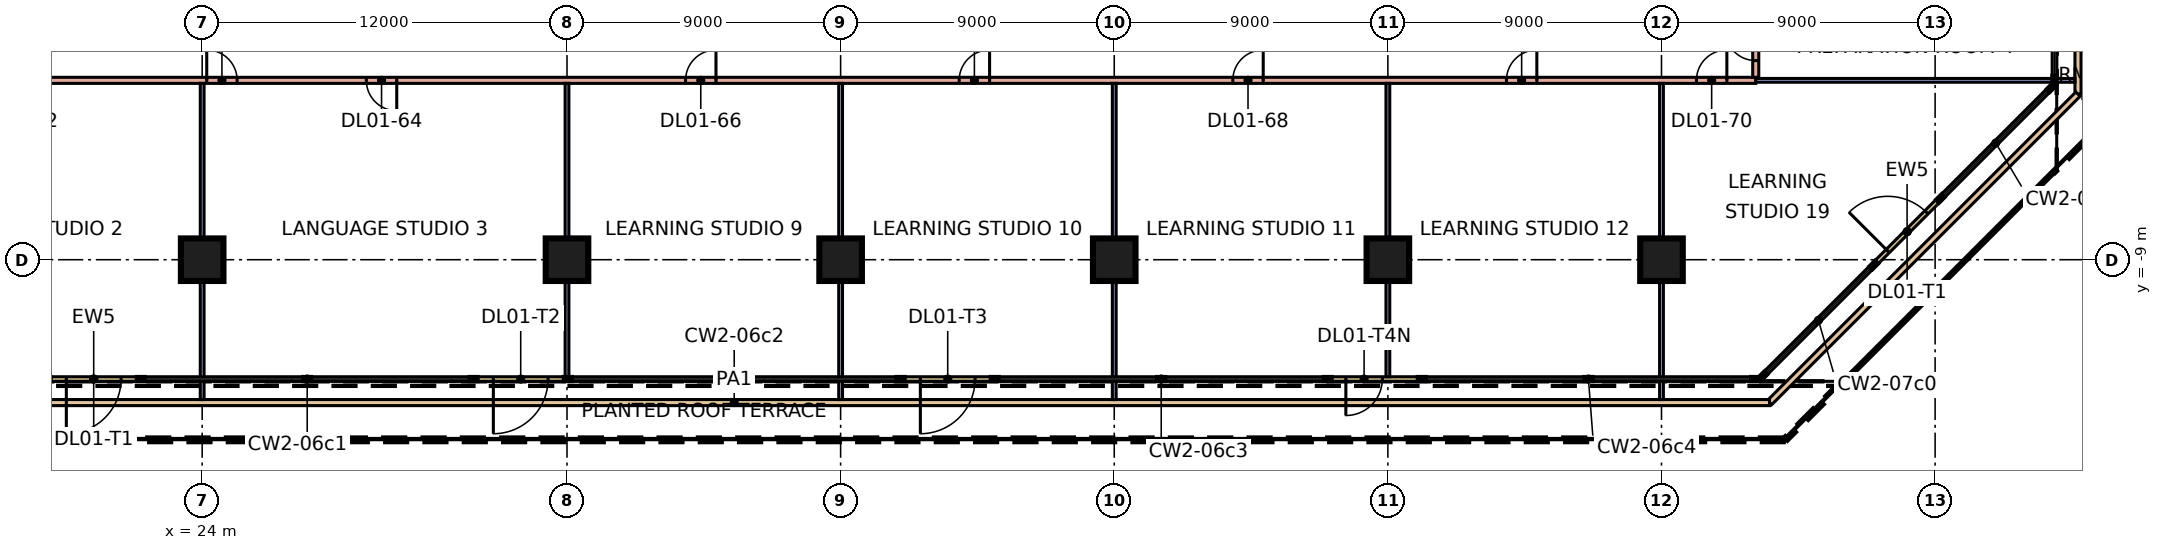
"""IFC4 building model, lengths in metres.
Left out: names, types, materials, properties, quantities, classifications, styles, units other than length and angle.
Written with IfcOpenShell. Run it as: python <this file> out.ifc"""

import sys

from ifc_helpers import new_model, si_unit, direction, frame, frame_2d, origin, origin_2d, place, context, subcontext, project, spatial, rectangle, extrude, element, fill, save


model = new_model("IFC4")
c1 = context("Model", 3, precision=1e-05, world=origin(), true_north=direction((0.0, 1.0)))
c2 = subcontext(c1, "Body", "Model", "MODEL_VIEW")
j1 = project(units=[si_unit("LENGTHUNIT", "METRE"), si_unit("PLANEANGLEUNIT", "RADIAN")], contexts=[c1])
p1 = place(None, origin())
s1 = spatial("IfcSite", under=j1, at=p1, CompositionType="ELEMENT")
p2 = place(p1, origin())
s2 = spatial("IfcBuilding", under=s1, at=p2, CompositionType="ELEMENT")
p3 = place(p2, frame((0.0, 0.0, 7.2)))
s3 = spatial("IfcBuildingStorey", under=s2, at=p3, CompositionType="ELEMENT", Elevation=7.2)
for number, where, z_axis, x_axis in (
    (1, (24.0, -9.0, 0.0), (0.0, 0.0, 1.0), (1.0, 0.0, 0.0)),
    (2, (36.0, -9.0, 0.0), (0.0, 0.0, 1.0), (1.0, 0.0, 0.0)),
    (3, (45.0, -9.0, 0.0), (0.0, 0.0, 1.0), (1.0, 0.0, 0.0)),
    (4, (54.0, -9.0, 0.0), (0.0, 0.0, 1.0), (1.0, 0.0, 0.0)),
    (5, (63.0, -9.0, 0.0), (0.0, 0.0, 1.0), (1.0, 0.0, 0.0)),
    (6, (72.0, -9.0, 0.0), (0.0, 0.0, 1.0), (1.0, 0.0, 0.0)),
):
    element("IfcColumn", number, at=place(p3, frame(where, z_axis=z_axis, x_axis=x_axis)), inside=s3, PredefinedType="COLUMN", context=c2, shape_type="SweptSolid", body=[
        extrude(rectangle(XDim=1.4, YDim=1.4, at=origin_2d()), origin(), (0.0, 0.0, 1.0), 4.8),
    ])
p4 = place(p3, frame((18.932, -12.925, 0.0), z_axis=(0.0, 0.0, 1.0), x_axis=(1.0, 0.0, 0.0)))
e7 = element("IfcWall", 7, at=p4, inside=s3, PredefinedType="SOLIDWALL", context=c2, shape_type="SweptSolid", body=[
    extrude(rectangle(XDim=3.0, YDim=0.15, at=frame_2d((1.5, 0.0))), origin(), (0.0, 0.0, 1.0), 4.4),
])
p5 = place(p4, frame((0.6, 0.0, 0.0)))
e8 = element("IfcOpeningElement", 8, at=p5, cuts=e7, PredefinedType="OPENING", context=c2, shape_type="SweptSolid", body=[
    extrude(rectangle(XDim=1.8, YDim=2.4, at=frame_2d((0.9, 1.2))), frame((0.0, 0.085, 0.0), z_axis=(0.0, -1.0, 0.0), x_axis=(1.0, 0.0, 0.0)), (0.0, 0.0, 1.0), 0.17),
])
p6 = place(p3, frame((32.977, -12.925, 0.0), z_axis=(0.0, 0.0, 1.0), x_axis=(1.0, 0.0, 0.0)))
e9 = element("IfcWall", 9, at=p6, inside=s3, PredefinedType="SOLIDWALL", context=c2, shape_type="SweptSolid", body=[
    extrude(rectangle(XDim=3.0, YDim=0.15, at=frame_2d((1.5, 0.0))), origin(), (0.0, 0.0, 1.0), 4.4),
])
p7 = place(p6, frame((0.6, 0.0, 0.0)))
e10 = element("IfcOpeningElement", 10, at=p7, cuts=e9, PredefinedType="OPENING", context=c2, shape_type="SweptSolid", body=[
    extrude(rectangle(XDim=1.8, YDim=2.4, at=frame_2d((0.9, 1.2))), frame((0.0, 0.085, 0.0), z_axis=(0.0, -1.0, 0.0), x_axis=(1.0, 0.0, 0.0)), (0.0, 0.0, 1.0), 0.17),
])
p8 = place(p3, frame((47.023, -12.925, 0.0), z_axis=(0.0, 0.0, 1.0), x_axis=(1.0, 0.0, 0.0)))
e11 = element("IfcWall", 11, at=p8, inside=s3, PredefinedType="SOLIDWALL", context=c2, shape_type="SweptSolid", body=[
    extrude(rectangle(XDim=3.0, YDim=0.15, at=frame_2d((1.5, 0.0))), origin(), (0.0, 0.0, 1.0), 4.4),
])
p9 = place(p8, frame((0.6, 0.0, 0.0)))
e12 = element("IfcOpeningElement", 12, at=p9, cuts=e11, PredefinedType="OPENING", context=c2, shape_type="SweptSolid", body=[
    extrude(rectangle(XDim=1.8, YDim=2.4, at=frame_2d((0.9, 1.2))), frame((0.0, 0.085, 0.0), z_axis=(0.0, -1.0, 0.0), x_axis=(1.0, 0.0, 0.0)), (0.0, 0.0, 1.0), 0.17),
])
p10 = place(p3, frame((61.068, -12.925, 0.0), z_axis=(0.0, 0.0, 1.0), x_axis=(1.0, 0.0, 0.0)))
e13 = element("IfcWall", 13, at=p10, inside=s3, PredefinedType="SOLIDWALL", context=c2, shape_type="SweptSolid", body=[
    extrude(rectangle(XDim=3.0, YDim=0.15, at=frame_2d((1.5, 0.0))), origin(), (0.0, 0.0, 1.0), 4.4),
])
p11 = place(p10, frame((0.55, 0.0, 0.0)))
e14 = element("IfcOpeningElement", 14, at=p11, cuts=e13, PredefinedType="OPENING", context=c2, shape_type="SweptSolid", body=[
    extrude(rectangle(XDim=1.2, YDim=2.4, at=frame_2d((0.6, 1.2))), frame((0.0, 0.085, 0.0), z_axis=(0.0, -1.0, 0.0), x_axis=(1.0, 0.0, 0.0)), (0.0, 0.0, 1.0), 0.17),
])
p12 = place(p3, frame((79.018, -9.139, 0.0), z_axis=(0.0, 0.0, 1.0), x_axis=(0.707106781187, 0.707106781187, 0.0)))
e15 = element("IfcWall", 15, at=p12, inside=s3, PredefinedType="SOLIDWALL", context=c2, shape_type="SweptSolid", body=[
    extrude(rectangle(XDim=3.0, YDim=0.15, at=frame_2d((1.5, 0.0))), origin(), (0.0, 0.0, 1.0), 4.4),
])
p13 = place(p12, frame((0.6, 0.0, 0.0)))
e16 = element("IfcOpeningElement", 16, at=p13, cuts=e15, PredefinedType="OPENING", context=c2, shape_type="SweptSolid", body=[
    extrude(rectangle(XDim=1.8, YDim=2.4, at=frame_2d((0.9, 1.2))), frame((0.0, 0.085, 0.0), z_axis=(0.0, -1.0, 0.0), x_axis=(1.0, 0.0, 0.0)), (0.0, 0.0, 1.0), 0.17),
])
p14 = place(p3, frame((85.7, 27.553, 0.0), z_axis=(0.0, 0.0, 1.0), x_axis=(0.0, -1.0, 0.0)))
e17 = element("IfcWall", 17, at=p14, inside=s3, PredefinedType="PARAPET", context=c2, shape_type="SweptSolid", body=[
    extrude(rectangle(XDim=31.107, YDim=0.2, at=frame_2d((15.553, 0.0))), origin(), (0.0, 0.0, 1.0), 0.5),
])
p15 = place(p3, frame((85.7, -3.553, 0.0), z_axis=(0.0, 0.0, 1.0), x_axis=(-0.707106781187, -0.707106781187, 0.0)))
e18 = element("IfcWall", 18, at=p15, inside=s3, PredefinedType="PARAPET", context=c2, shape_type="SweptSolid", body=[
    extrude(rectangle(XDim=14.349, YDim=0.2, at=frame_2d((7.175, 0.0))), origin(), (0.0, 0.0, 1.0), 0.5),
])
p16 = place(p3, frame((75.553, -13.7, 0.0), z_axis=(0.0, 0.0, 1.0), x_axis=(-1.0, 0.0, 0.0)))
e19 = element("IfcWall", 19, at=p16, inside=s3, PredefinedType="PARAPET", context=c2, shape_type="SweptSolid", body=[
    extrude(rectangle(XDim=68.107, YDim=0.2, at=frame_2d((34.053, 0.0))), origin(), (0.0, 0.0, 1.0), 0.5),
])
p17 = place(p3, frame((-1.953, -3.1, 0.0), z_axis=(0.0, 0.0, 1.0), x_axis=(1.0, 0.0, 0.0)))
e20 = element("IfcWall", 20, at=p17, inside=s3, PredefinedType="PARTITIONING", context=c2, shape_type="SweptSolid", body=[
    extrude(rectangle(XDim=77.053, YDim=0.2, at=frame_2d((38.526, 0.0))), origin(), (0.0, 0.0, 1.0), 4.4),
])
p18 = place(p17, frame((7.353, 0.0, 0.0)))
e21 = element("IfcOpeningElement", 21, at=p18, cuts=e20, PredefinedType="OPENING", context=c2, shape_type="SweptSolid", body=[
    extrude(rectangle(XDim=1.0, YDim=2.1, at=frame_2d((0.5, 1.05))), frame((0.0, 0.11, 0.0), z_axis=(0.0, -1.0, 0.0), x_axis=(1.0, 0.0, 0.0)), (0.0, 0.0, 1.0), 0.22),
])
p19 = place(p17, frame((19.353, 0.0, 0.0)))
e22 = element("IfcOpeningElement", 22, at=p19, cuts=e20, PredefinedType="OPENING", context=c2, shape_type="SweptSolid", body=[
    extrude(rectangle(XDim=1.0, YDim=2.1, at=frame_2d((0.5, 1.05))), frame((0.0, 0.11, 0.0), z_axis=(0.0, -1.0, 0.0), x_axis=(1.0, 0.0, 0.0)), (0.0, 0.0, 1.0), 0.22),
])
p20 = place(p17, frame((14.103, 0.0, 0.0)))
e23 = element("IfcOpeningElement", 23, at=p20, cuts=e20, PredefinedType="OPENING", context=c2, shape_type="SweptSolid", body=[
    extrude(rectangle(XDim=1.0, YDim=2.1, at=frame_2d((0.5, 1.05))), frame((0.0, 0.11, 0.0), z_axis=(0.0, -1.0, 0.0), x_axis=(1.0, 0.0, 0.0)), (0.0, 0.0, 1.0), 0.22),
])
p21 = place(p17, frame((31.353, 0.0, 0.0)))
e24 = element("IfcOpeningElement", 24, at=p21, cuts=e20, PredefinedType="OPENING", context=c2, shape_type="SweptSolid", body=[
    extrude(rectangle(XDim=1.0, YDim=2.1, at=frame_2d((0.5, 1.05))), frame((0.0, 0.11, 0.0), z_axis=(0.0, -1.0, 0.0), x_axis=(1.0, 0.0, 0.0)), (0.0, 0.0, 1.0), 0.22),
])
p22 = place(p17, frame((26.103, 0.0, 0.0)))
e25 = element("IfcOpeningElement", 25, at=p22, cuts=e20, PredefinedType="OPENING", context=c2, shape_type="SweptSolid", body=[
    extrude(rectangle(XDim=1.0, YDim=2.1, at=frame_2d((0.5, 1.05))), frame((0.0, 0.11, 0.0), z_axis=(0.0, -1.0, 0.0), x_axis=(1.0, 0.0, 0.0)), (0.0, 0.0, 1.0), 0.22),
])
p23 = place(p17, frame((41.853, 0.0, 0.0)))
e26 = element("IfcOpeningElement", 26, at=p23, cuts=e20, PredefinedType="OPENING", context=c2, shape_type="SweptSolid", body=[
    extrude(rectangle(XDim=1.0, YDim=2.1, at=frame_2d((0.5, 1.05))), frame((0.0, 0.11, 0.0), z_axis=(0.0, -1.0, 0.0), x_axis=(1.0, 0.0, 0.0)), (0.0, 0.0, 1.0), 0.22),
])
p24 = place(p17, frame((50.853, 0.0, 0.0)))
e27 = element("IfcOpeningElement", 27, at=p24, cuts=e20, PredefinedType="OPENING", context=c2, shape_type="SweptSolid", body=[
    extrude(rectangle(XDim=1.0, YDim=2.1, at=frame_2d((0.5, 1.05))), frame((0.0, 0.11, 0.0), z_axis=(0.0, -1.0, 0.0), x_axis=(1.0, 0.0, 0.0)), (0.0, 0.0, 1.0), 0.22),
])
p25 = place(p17, frame((59.853, 0.0, 0.0)))
e28 = element("IfcOpeningElement", 28, at=p25, cuts=e20, PredefinedType="OPENING", context=c2, shape_type="SweptSolid", body=[
    extrude(rectangle(XDim=1.0, YDim=2.1, at=frame_2d((0.5, 1.05))), frame((0.0, 0.11, 0.0), z_axis=(0.0, -1.0, 0.0), x_axis=(1.0, 0.0, 0.0)), (0.0, 0.0, 1.0), 0.22),
])
p26 = place(p17, frame((68.853, 0.0, 0.0)))
e29 = element("IfcOpeningElement", 29, at=p26, cuts=e20, PredefinedType="OPENING", context=c2, shape_type="SweptSolid", body=[
    extrude(rectangle(XDim=1.0, YDim=2.1, at=frame_2d((0.5, 1.05))), frame((0.0, 0.11, 0.0), z_axis=(0.0, -1.0, 0.0), x_axis=(1.0, 0.0, 0.0)), (0.0, 0.0, 1.0), 0.22),
])
p27 = place(p17, frame((75.103, 0.0, 0.0)))
e30 = element("IfcOpeningElement", 30, at=p27, cuts=e20, PredefinedType="OPENING", context=c2, shape_type="SweptSolid", body=[
    extrude(rectangle(XDim=1.0, YDim=2.1, at=frame_2d((0.5, 1.05))), frame((0.0, 0.11, 0.0), z_axis=(0.0, -1.0, 0.0), x_axis=(1.0, 0.0, 0.0)), (0.0, 0.0, 1.0), 0.22),
])
p28 = place(p3, frame((24.0, -13.6, 0.0), z_axis=(0.0, 0.0, 1.0), x_axis=(0.0, 1.0, 0.0)))
e31 = element("IfcWall", 31, at=p28, inside=s3, PredefinedType="PARTITIONING", context=c2, shape_type="SweptSolid", body=[
    extrude(rectangle(XDim=10.4, YDim=0.125, at=frame_2d((5.2, 0.0))), origin(), (0.0, 0.0, 1.0), 4.4),
])
p29 = place(p3, frame((36.0, -12.925, 0.0), z_axis=(0.0, 0.0, 1.0), x_axis=(0.0, 1.0, 0.0)))
e32 = element("IfcWall", 32, at=p29, inside=s3, PredefinedType="PARTITIONING", context=c2, shape_type="SweptSolid", body=[
    extrude(rectangle(XDim=9.725, YDim=0.125, at=frame_2d((4.863, 0.0))), origin(), (0.0, 0.0, 1.0), 4.4),
])
for number, where, z_axis, x_axis in (
    (33, (45.0, -13.6, 0.0), (0.0, 0.0, 1.0), (0.0, 1.0, 0.0)),
    (34, (54.0, -13.6, 0.0), (0.0, 0.0, 1.0), (0.0, 1.0, 0.0)),
):
    element("IfcWall", number, at=place(p3, frame(where, z_axis=z_axis, x_axis=x_axis)), inside=s3, PredefinedType="PARTITIONING", context=c2, shape_type="SweptSolid", body=[
        extrude(rectangle(XDim=10.4, YDim=0.125, at=frame_2d((5.2, 0.0))), origin(), (0.0, 0.0, 1.0), 4.4),
    ])
p30 = place(p3, frame((63.0, -12.851, 0.0), z_axis=(0.0, 0.0, 1.0), x_axis=(0.0, 1.0, 0.0)))
e35 = element("IfcWall", 35, at=p30, inside=s3, PredefinedType="PARTITIONING", context=c2, shape_type="SweptSolid", body=[
    extrude(rectangle(XDim=9.651, YDim=0.125, at=frame_2d((4.826, 0.0))), origin(), (0.0, 0.0, 1.0), 4.4),
])
p31 = place(p3, frame((72.0, -13.6, 0.0), z_axis=(0.0, 0.0, 1.0), x_axis=(0.0, 1.0, 0.0)))
e36 = element("IfcWall", 36, at=p31, inside=s3, PredefinedType="PARTITIONING", context=c2, shape_type="SweptSolid", body=[
    extrude(rectangle(XDim=10.4, YDim=0.125, at=frame_2d((5.2, 0.0))), origin(), (0.0, 0.0, 1.0), 4.4),
])
p32 = place(p3, frame((75.1, -3.1, 0.0), z_axis=(0.0, 0.0, 1.0), x_axis=(1.0, 0.0, 0.0)))
e37 = element("IfcWall", 37, at=p32, inside=s3, PredefinedType="PARTITIONING", context=c2, shape_type="SweptSolid", body=[
    extrude(rectangle(XDim=10.5, YDim=0.125, at=frame_2d((5.25, 0.0))), origin(), (0.0, 0.0, 1.0), 4.4),
])
p33 = place(p3, frame((75.1, -3.0, 0.0), z_axis=(0.0, 0.0, 1.0), x_axis=(0.0, 1.0, 0.0)))
e38 = element("IfcWall", 38, at=p33, inside=s3, PredefinedType="PARTITIONING", context=c2, shape_type="SweptSolid", body=[
    extrude(rectangle(XDim=30.0, YDim=0.2, at=frame_2d((15.0, 0.0))), origin(), (0.0, 0.0, 1.0), 4.4),
])
p34 = place(p33, frame((0.55, 0.0, 0.0)))
e39 = element("IfcOpeningElement", 39, at=p34, cuts=e38, PredefinedType="OPENING", context=c2, shape_type="SweptSolid", body=[
    extrude(rectangle(XDim=1.0, YDim=2.1, at=frame_2d((0.5, 1.05))), frame((0.0, 0.11, 0.0), z_axis=(0.0, -1.0, 0.0), x_axis=(1.0, 0.0, 0.0)), (0.0, 0.0, 1.0), 0.22),
])
p35 = place(p33, frame((8.4, 0.0, 0.0)))
e40 = element("IfcOpeningElement", 40, at=p35, cuts=e38, PredefinedType="OPENING", context=c2, shape_type="SweptSolid", body=[
    extrude(rectangle(XDim=1.0, YDim=2.1, at=frame_2d((0.5, 1.05))), frame((0.0, 0.11, 0.0), z_axis=(0.0, -1.0, 0.0), x_axis=(1.0, 0.0, 0.0)), (0.0, 0.0, 1.0), 0.22),
])
p36 = place(p33, frame((3.15, 0.0, 0.0)))
e41 = element("IfcOpeningElement", 41, at=p36, cuts=e38, PredefinedType="OPENING", context=c2, shape_type="SweptSolid", body=[
    extrude(rectangle(XDim=1.0, YDim=2.1, at=frame_2d((0.5, 1.05))), frame((0.0, 0.11, 0.0), z_axis=(0.0, -1.0, 0.0), x_axis=(1.0, 0.0, 0.0)), (0.0, 0.0, 1.0), 0.22),
])
p37 = place(p33, frame((22.25, 0.0, 0.0)))
e42 = element("IfcOpeningElement", 42, at=p37, cuts=e38, PredefinedType="OPENING", context=c2, shape_type="SweptSolid", body=[
    extrude(rectangle(XDim=1.0, YDim=2.1, at=frame_2d((0.5, 1.05))), frame((0.0, 0.11, 0.0), z_axis=(0.0, -1.0, 0.0), x_axis=(1.0, 0.0, 0.0)), (0.0, 0.0, 1.0), 0.22),
])
p38 = place(p33, frame((18.75, 0.0, 0.0)))
e43 = element("IfcOpeningElement", 43, at=p38, cuts=e38, PredefinedType="OPENING", context=c2, shape_type="SweptSolid", body=[
    extrude(rectangle(XDim=1.0, YDim=2.1, at=frame_2d((0.5, 1.05))), frame((0.0, 0.11, 0.0), z_axis=(0.0, -1.0, 0.0), x_axis=(1.0, 0.0, 0.0)), (0.0, 0.0, 1.0), 0.22),
])
p39 = place(p33, frame((28.35, 0.0, 0.0)))
e44 = element("IfcOpeningElement", 44, at=p39, cuts=e38, PredefinedType="OPENING", context=c2, shape_type="SweptSolid", body=[
    extrude(rectangle(XDim=1.0, YDim=2.1, at=frame_2d((0.5, 1.05))), frame((0.0, 0.11, 0.0), z_axis=(0.0, -1.0, 0.0), x_axis=(1.0, 0.0, 0.0)), (0.0, 0.0, 1.0), 0.22),
])
p40 = place(p5, frame((1.8, 0.0, 0.0), z_axis=(0.0, 0.0, 1.0), x_axis=(-1.0, 0.0, 0.0)))
e45 = element("IfcDoor", 45, at=p40, inside=s3, OperationType="DOUBLE_DOOR_SINGLE_SWING", PredefinedType="DOOR", context=c2, shape_type="SweptSolid", body=[
    extrude(rectangle(XDim=1.8, YDim=2.4, at=frame_2d((0.9, 1.2))), frame((0.0, 0.025, 0.0), z_axis=(0.0, -1.0, 0.0), x_axis=(1.0, 0.0, 0.0)), (0.0, 0.0, 1.0), 0.05),
])
fill(e8, e45)
p41 = place(p7, frame((1.8, 0.0, 0.0), z_axis=(0.0, 0.0, 1.0), x_axis=(-1.0, 0.0, 0.0)))
e46 = element("IfcDoor", 46, at=p41, inside=s3, OperationType="DOUBLE_DOOR_SINGLE_SWING", PredefinedType="DOOR", context=c2, shape_type="SweptSolid", body=[
    extrude(rectangle(XDim=1.8, YDim=2.4, at=frame_2d((0.9, 1.2))), frame((0.0, 0.025, 0.0), z_axis=(0.0, -1.0, 0.0), x_axis=(1.0, 0.0, 0.0)), (0.0, 0.0, 1.0), 0.05),
])
fill(e10, e46)
p42 = place(p9, frame((1.8, 0.0, 0.0), z_axis=(0.0, 0.0, 1.0), x_axis=(-1.0, 0.0, 0.0)))
e47 = element("IfcDoor", 47, at=p42, inside=s3, OperationType="DOUBLE_DOOR_SINGLE_SWING", PredefinedType="DOOR", context=c2, shape_type="SweptSolid", body=[
    extrude(rectangle(XDim=1.8, YDim=2.4, at=frame_2d((0.9, 1.2))), frame((0.0, 0.025, 0.0), z_axis=(0.0, -1.0, 0.0), x_axis=(1.0, 0.0, 0.0)), (0.0, 0.0, 1.0), 0.05),
])
fill(e12, e47)
p43 = place(p11, frame((1.2, 0.0, 0.0), z_axis=(0.0, 0.0, 1.0), x_axis=(-1.0, 0.0, 0.0)))
e48 = element("IfcDoor", 48, at=p43, inside=s3, OperationType="DOUBLE_DOOR_SINGLE_SWING", PredefinedType="DOOR", context=c2, shape_type="SweptSolid", body=[
    extrude(rectangle(XDim=1.2, YDim=2.4, at=frame_2d((0.6, 1.2))), frame((0.0, 0.025, 0.0), z_axis=(0.0, -1.0, 0.0), x_axis=(1.0, 0.0, 0.0)), (0.0, 0.0, 1.0), 0.05),
])
fill(e14, e48)
p44 = place(p13, origin())
e49 = element("IfcDoor", 49, at=p44, inside=s3, OperationType="DOUBLE_DOOR_SINGLE_SWING", PredefinedType="DOOR", context=c2, shape_type="SweptSolid", body=[
    extrude(rectangle(XDim=1.8, YDim=2.4, at=frame_2d((0.9, 1.2))), frame((0.0, 0.025, 0.0), z_axis=(0.0, -1.0, 0.0), x_axis=(1.0, 0.0, 0.0)), (0.0, 0.0, 1.0), 0.05),
])
fill(e16, e49)
p45 = place(p34, frame((1.0, 0.0, 0.0), z_axis=(0.0, 0.0, 1.0), x_axis=(-1.0, 0.0, 0.0)))
e50 = element("IfcDoor", 50, at=p45, inside=s3, OperationType="SINGLE_SWING_RIGHT", PredefinedType="DOOR", context=c2, shape_type="SweptSolid", body=[
    extrude(rectangle(XDim=1.0, YDim=2.1, at=frame_2d((0.5, 1.05))), frame((0.0, 0.025, 0.0), z_axis=(0.0, -1.0, 0.0), x_axis=(1.0, 0.0, 0.0)), (0.0, 0.0, 1.0), 0.05),
])
fill(e39, e50)
p46 = place(p21, origin())
e51 = element("IfcDoor", 51, at=p46, inside=s3, OperationType="SINGLE_SWING_RIGHT", PredefinedType="DOOR", context=c2, shape_type="SweptSolid", body=[
    extrude(rectangle(XDim=1.0, YDim=2.1, at=frame_2d((0.5, 1.05))), frame((0.0, 0.025, 0.0), z_axis=(0.0, -1.0, 0.0), x_axis=(1.0, 0.0, 0.0)), (0.0, 0.0, 1.0), 0.05),
])
fill(e24, e51)
p47 = place(p22, origin())
e52 = element("IfcDoor", 52, at=p47, inside=s3, OperationType="SINGLE_SWING_LEFT", PredefinedType="DOOR", context=c2, shape_type="SweptSolid", body=[
    extrude(rectangle(XDim=1.0, YDim=2.1, at=frame_2d((0.5, 1.05))), frame((0.0, 0.025, 0.0), z_axis=(0.0, -1.0, 0.0), x_axis=(1.0, 0.0, 0.0)), (0.0, 0.0, 1.0), 0.05),
])
fill(e25, e52)
p48 = place(p23, frame((1.0, 0.0, 0.0), z_axis=(0.0, 0.0, 1.0), x_axis=(-1.0, 0.0, 0.0)))
e53 = element("IfcDoor", 53, at=p48, inside=s3, OperationType="SINGLE_SWING_RIGHT", PredefinedType="DOOR", context=c2, shape_type="SweptSolid", body=[
    extrude(rectangle(XDim=1.0, YDim=2.1, at=frame_2d((0.5, 1.05))), frame((0.0, 0.025, 0.0), z_axis=(0.0, -1.0, 0.0), x_axis=(1.0, 0.0, 0.0)), (0.0, 0.0, 1.0), 0.05),
])
fill(e26, e53)
p49 = place(p24, frame((1.0, 0.0, 0.0), z_axis=(0.0, 0.0, 1.0), x_axis=(-1.0, 0.0, 0.0)))
e54 = element("IfcDoor", 54, at=p49, inside=s3, OperationType="SINGLE_SWING_RIGHT", PredefinedType="DOOR", context=c2, shape_type="SweptSolid", body=[
    extrude(rectangle(XDim=1.0, YDim=2.1, at=frame_2d((0.5, 1.05))), frame((0.0, 0.025, 0.0), z_axis=(0.0, -1.0, 0.0), x_axis=(1.0, 0.0, 0.0)), (0.0, 0.0, 1.0), 0.05),
])
fill(e27, e54)
p50 = place(p25, frame((1.0, 0.0, 0.0), z_axis=(0.0, 0.0, 1.0), x_axis=(-1.0, 0.0, 0.0)))
e55 = element("IfcDoor", 55, at=p50, inside=s3, OperationType="SINGLE_SWING_RIGHT", PredefinedType="DOOR", context=c2, shape_type="SweptSolid", body=[
    extrude(rectangle(XDim=1.0, YDim=2.1, at=frame_2d((0.5, 1.05))), frame((0.0, 0.025, 0.0), z_axis=(0.0, -1.0, 0.0), x_axis=(1.0, 0.0, 0.0)), (0.0, 0.0, 1.0), 0.05),
])
fill(e28, e55)
p51 = place(p26, frame((1.0, 0.0, 0.0), z_axis=(0.0, 0.0, 1.0), x_axis=(-1.0, 0.0, 0.0)))
e56 = element("IfcDoor", 56, at=p51, inside=s3, OperationType="SINGLE_SWING_RIGHT", PredefinedType="DOOR", context=c2, shape_type="SweptSolid", body=[
    extrude(rectangle(XDim=1.0, YDim=2.1, at=frame_2d((0.5, 1.05))), frame((0.0, 0.025, 0.0), z_axis=(0.0, -1.0, 0.0), x_axis=(1.0, 0.0, 0.0)), (0.0, 0.0, 1.0), 0.05),
])
fill(e29, e56)
p52 = place(p27, frame((1.0, 0.0, 0.0), z_axis=(0.0, 0.0, 1.0), x_axis=(-1.0, 0.0, 0.0)))
e57 = element("IfcDoor", 57, at=p52, inside=s3, OperationType="SINGLE_SWING_RIGHT", PredefinedType="DOOR", context=c2, shape_type="SweptSolid", body=[
    extrude(rectangle(XDim=1.0, YDim=2.1, at=frame_2d((0.5, 1.05))), frame((0.0, 0.025, 0.0), z_axis=(0.0, -1.0, 0.0), x_axis=(1.0, 0.0, 0.0)), (0.0, 0.0, 1.0), 0.05),
])
fill(e30, e57)
save(model, sys.argv[1])
